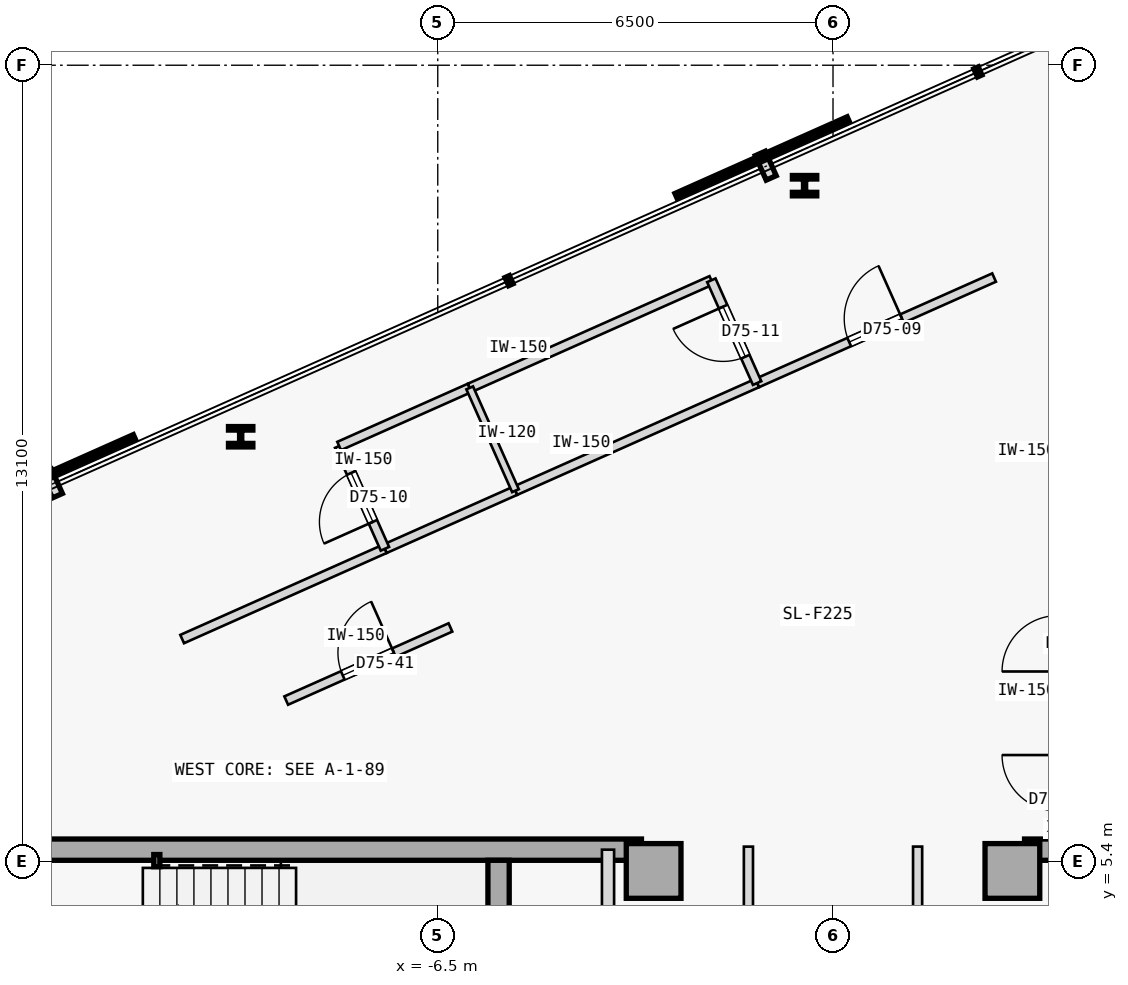
"""IFC4 building model, lengths in metres.
Left out: names, types, materials, properties, quantities, classifications, styles, units other than length and angle.
Written with IfcOpenShell. Run it as: python <this file> out.ifc"""

import sys

from ifc_helpers import new_model, si_unit, direction, frame, frame_2d, origin, origin_2d, place, context, subcontext, project, spatial, rectangle, hollow_rectangle, i_section, extrude, element, fill, save


model = new_model("IFC4")
c1 = context("Model", 3, precision=1e-05, world=origin(), true_north=direction((0.0, 1.0)))
c2 = subcontext(c1, "Body", "Model", "MODEL_VIEW")
j1 = project(units=[si_unit("LENGTHUNIT", "METRE"), si_unit("PLANEANGLEUNIT", "RADIAN")], contexts=[c1])
p1 = place(None, origin())
s1 = spatial("IfcSite", under=j1, at=p1, CompositionType="ELEMENT")
p2 = place(p1, origin())
s2 = spatial("IfcBuilding", under=s1, at=p2, CompositionType="ELEMENT")
p3 = place(p2, frame((0.0, 0.0, 281.9)))
s3 = spatial("IfcBuildingStorey", under=s2, at=p3, CompositionType="ELEMENT", Elevation=281.9)
for number, where, z_axis, x_axis in (
    (1, (-2.95, 5.25, 0.0), (0.0, 0.0, 1.0), (1.0, 0.0, 0.0)),
    (2, (2.95, 5.25, 0.0), (0.0, 0.0, 1.0), (1.0, 0.0, 0.0)),
):
    element("IfcColumn", number, at=place(p3, frame(where, z_axis=z_axis, x_axis=x_axis)), inside=s3, PredefinedType="COLUMN", context=c2, shape_type="SweptSolid", body=[
        extrude(rectangle(XDim=0.9, YDim=0.9, at=origin_2d()), origin(), (0.0, 0.0, 1.0), 3.35),
    ])
p4 = place(p3, frame((-14.56, 5.6, 0.0), z_axis=(0.0, 0.0, 1.0), x_axis=(1.0, 0.0, 0.0)))
e3 = element("IfcWall", 3, at=p4, inside=s3, PredefinedType="SHEAR", context=c2, shape_type="SweptSolid", body=[
    extrude(rectangle(XDim=11.41, YDim=0.35, at=frame_2d((5.705, 0.0))), origin(), (0.0, 0.0, 1.0), 3.125),
])
p5 = place(p3, frame((-5.5, 2.15, 0.0), z_axis=(0.0, 0.0, 1.0), x_axis=(0.0, 1.0, 0.0)))
e4 = element("IfcWall", 4, at=p5, inside=s3, PredefinedType="SHEAR", context=c2, shape_type="SweptSolid", body=[
    extrude(rectangle(XDim=3.275, YDim=0.35, at=frame_2d((1.638, 0.0))), origin(), (0.0, 0.0, 1.0), 3.125),
])
p6 = place(p3, frame((3.15, 5.6, 0.0), z_axis=(0.0, 0.0, 1.0), x_axis=(1.0, 0.0, 0.0)))
e5 = element("IfcWall", 5, at=p6, inside=s3, PredefinedType="SHEAR", context=c2, shape_type="SweptSolid", body=[
    extrude(rectangle(XDim=11.41, YDim=0.35, at=frame_2d((5.705, 0.0))), origin(), (0.0, 0.0, 1.0), 3.125),
])
p7 = place(p3, frame((-11.12, 5.42, 0.0), z_axis=(0.0, 0.0, 1.0), x_axis=(1.0, 0.0, 0.0)))
e6 = element("IfcColumn", 6, at=p7, inside=s3, PredefinedType="COLUMN", context=c2, shape_type="SweptSolid", body=[
    extrude(hollow_rectangle(XDim=0.1, YDim=0.2, WallThickness=0.008, at=origin_2d()), origin(), (0.0, 0.0, 1.0), 3.35),
])
for number, where, z_axis, x_axis in (
    (7, (-0.468, 16.519, 0.0), (0.0, 0.0, 1.0), (1.0, 0.0, 0.0)),
    (8, (-9.741, 12.39, 0.0), (0.0, 0.0, 1.0), (1.0, 0.0, 0.0)),
):
    element("IfcColumn", number, at=place(p3, frame(where, z_axis=z_axis, x_axis=x_axis)), inside=s3, PredefinedType="COLUMN", context=c2, shape_type="SweptSolid", body=[
        extrude(i_section(OverallWidth=0.401, OverallDepth=0.335, WebThickness=0.036, FlangeThickness=0.058, FilletRadius=0.015, at=origin_2d()), origin(), (0.0, 0.0, 1.0), 3.35),
    ])
p8 = place(p3, frame((-3.7, -1.15, 0.0), z_axis=(0.0, 0.0, 1.0), x_axis=(0.0, 1.0, 0.0)))
e9 = element("IfcWall", 9, at=p8, inside=s3, PredefinedType="STANDARD", context=c2, shape_type="SweptSolid", body=[
    extrude(rectangle(XDim=6.75, YDim=0.2, at=frame_2d((3.375, 0.0))), origin(), (0.0, 0.0, 1.0), 3.125),
])
p9 = place(p8, frame((3.6, 0.0, 0.0)))
e10 = element("IfcOpeningElement", 10, at=p9, cuts=e9, PredefinedType="OPENING", context=c2, shape_type="SweptSolid", body=[
    extrude(rectangle(XDim=0.92, YDim=2.15, at=frame_2d((0.46, 1.075))), frame((0.0, 0.11, 0.0), z_axis=(0.0, -1.0, 0.0), x_axis=(1.0, 0.0, 0.0)), (0.0, 0.0, 1.0), 0.22),
])
p10 = place(p8, frame((0.85, 0.0, 0.0)))
e11 = element("IfcOpeningElement", 11, at=p10, cuts=e9, PredefinedType="OPENING", context=c2, shape_type="SweptSolid", body=[
    extrude(rectangle(XDim=0.9, YDim=2.15, at=frame_2d((0.45, 1.075))), frame((0.0, 0.11, 0.0), z_axis=(0.0, -1.0, 0.0), x_axis=(1.0, 0.0, 0.0)), (0.0, 0.0, 1.0), 0.22),
])
p11 = place(p3, frame((-1.391, -5.65, 0.0), z_axis=(0.0, 0.0, 1.0), x_axis=(-2.1605738e-05, 0.999999999767, 0.0)))
e12 = element("IfcWall", 12, at=p11, inside=s3, PredefinedType="PARTITIONING", context=c2, shape_type="SweptSolid", body=[
    extrude(rectangle(XDim=11.3, YDim=0.15, at=frame_2d((5.65, 0.0))), origin(), (0.0, 0.0, 1.0), 3.125),
])
p12 = place(p3, frame((1.391, -5.65, 0.0), z_axis=(0.0, 0.0, 1.0), x_axis=(4.3206809e-05, 0.999999999067, 0.0)))
e13 = element("IfcWall", 13, at=p12, inside=s3, PredefinedType="PARTITIONING", context=c2, shape_type="SweptSolid", body=[
    extrude(rectangle(XDim=11.301, YDim=0.15, at=frame_2d((5.65, 0.0))), origin(), (0.0, 0.0, 1.0), 3.125),
])
p13 = place(p12, frame((5.176, 0.0, 0.0)))
e14 = element("IfcOpeningElement", 14, at=p13, cuts=e13, PredefinedType="OPENING", context=c2, shape_type="SweptSolid", body=[
    extrude(rectangle(XDim=0.95, YDim=2.15, at=frame_2d((0.475, 1.075))), frame((0.0, 0.085, 0.0), z_axis=(0.0, -1.0, 0.0), x_axis=(1.0, 0.0, 0.0)), (0.0, 0.0, 1.0), 0.17),
])
p14 = place(p3, frame((-10.703, 9.063, 0.0), z_axis=(0.0, 0.0, 1.0), x_axis=(0.913543802, 0.40674036169, 0.0)))
e15 = element("IfcWall", 15, at=p14, inside=s3, PredefinedType="PARTITIONING", context=c2, shape_type="SweptSolid", body=[
    extrude(rectangle(XDim=3.65, YDim=0.15, at=frame_2d((1.825, 0.0))), origin(), (0.0, 0.0, 1.0), 3.125),
])
p15 = place(p3, frame((-1.248, 13.273, 0.0), z_axis=(0.0, 0.0, 1.0), x_axis=(0.913549402293, 0.40672778313, 0.0)))
e16 = element("IfcWall", 16, at=p15, inside=s3, PredefinedType="PARTITIONING", context=c2, shape_type="SweptSolid", body=[
    extrude(rectangle(XDim=4.266, YDim=0.15, at=frame_2d((2.133, 0.0))), origin(), (0.0, 0.0, 1.0), 3.125),
])
p16 = place(p15, frame((1.658, 0.0, 0.0)))
e17 = element("IfcOpeningElement", 17, at=p16, cuts=e16, PredefinedType="OPENING", context=c2, shape_type="SweptSolid", body=[
    extrude(rectangle(XDim=0.95, YDim=2.15, at=frame_2d((0.475, 1.075))), frame((0.0, 0.085, 0.0), z_axis=(0.0, -1.0, 0.0), x_axis=(1.0, 0.0, 0.0)), (0.0, 0.0, 1.0), 0.17),
])
p17 = place(p3, frame((-7.369, 10.548, 0.0), z_axis=(0.0, 0.0, 1.0), x_axis=(0.913541436194, 0.406745675276, 0.0)))
e18 = element("IfcWall", 18, at=p17, inside=s3, PredefinedType="PARTITIONING", context=c2, shape_type="SweptSolid", body=[
    extrude(rectangle(XDim=2.35, YDim=0.15, at=frame_2d((1.175, 0.0))), origin(), (0.0, 0.0, 1.0), 3.125),
])
p18 = place(p3, frame((-5.222, 11.504, 0.0), z_axis=(0.0, 0.0, 1.0), x_axis=(0.913545193015, 0.406737237438, 0.0)))
e19 = element("IfcWall", 19, at=p18, inside=s3, PredefinedType="PARTITIONING", context=c2, shape_type="SweptSolid", body=[
    extrude(rectangle(XDim=4.35, YDim=0.15, at=frame_2d((2.175, 0.0))), origin(), (0.0, 0.0, 1.0), 3.125),
])
p19 = place(p3, frame((-8.992, 8.052, 0.0), z_axis=(0.0, 0.0, 1.0), x_axis=(0.913535467925, 0.406759079607, 0.0)))
e20 = element("IfcWall", 20, at=p19, inside=s3, PredefinedType="PARTITIONING", context=c2, shape_type="SweptSolid", body=[
    extrude(rectangle(XDim=2.956, YDim=0.15, at=frame_2d((1.478, 0.0))), origin(), (0.0, 0.0, 1.0), 3.125),
])
p20 = place(p19, frame((1.018, 0.0, 0.0)))
e21 = element("IfcOpeningElement", 21, at=p20, cuts=e20, PredefinedType="OPENING", context=c2, shape_type="SweptSolid", body=[
    extrude(rectangle(XDim=0.92, YDim=2.15, at=frame_2d((0.46, 1.075))), frame((0.0, 0.085, 0.0), z_axis=(0.0, -1.0, 0.0), x_axis=(1.0, 0.0, 0.0)), (0.0, 0.0, 1.0), 0.17),
])
p21 = place(p3, frame((-7.369, 10.548, 0.0), z_axis=(0.0, 0.0, 1.0), x_axis=(-0.406860767979, 0.913490183571, 0.0)))
e22 = element("IfcWall", 22, at=p21, inside=s3, PredefinedType="PARTITIONING", context=c2, shape_type="SweptSolid", body=[
    extrude(rectangle(XDim=1.85, YDim=0.15, at=frame_2d((0.925, 0.0))), origin(), (0.0, 0.0, 1.0), 3.125),
])
p22 = place(p21, frame((0.485, 0.0, 0.0)))
e23 = element("IfcOpeningElement", 23, at=p22, cuts=e22, PredefinedType="OPENING", context=c2, shape_type="SweptSolid", body=[
    extrude(rectangle(XDim=0.88, YDim=2.15, at=frame_2d((0.44, 1.075))), frame((0.0, 0.085, 0.0), z_axis=(0.0, -1.0, 0.0), x_axis=(1.0, 0.0, 0.0)), (0.0, 0.0, 1.0), 0.17),
])
p23 = place(p3, frame((-8.122, 12.238, 0.0), z_axis=(0.0, 0.0, 1.0), x_axis=(0.913558622212, 0.406707073682, 0.0)))
e24 = element("IfcWall", 24, at=p23, inside=s3, PredefinedType="PARTITIONING", context=c2, shape_type="SweptSolid", body=[
    extrude(rectangle(XDim=2.35, YDim=0.15, at=frame_2d((1.175, 0.0))), origin(), (0.0, 0.0, 1.0), 3.125),
])
p24 = place(p3, frame((-5.975, 13.194, 0.0), z_axis=(0.0, 0.0, 1.0), x_axis=(0.913545193015, 0.406737237438, 0.0)))
e25 = element("IfcWall", 25, at=p24, inside=s3, PredefinedType="PARTITIONING", context=c2, shape_type="SweptSolid", body=[
    extrude(rectangle(XDim=4.35, YDim=0.15, at=frame_2d((2.175, 0.0))), origin(), (0.0, 0.0, 1.0), 3.125),
])
p25 = place(p3, frame((-1.248, 13.273, 0.0), z_axis=(0.0, 0.0, 1.0), x_axis=(-0.406750635596, 0.913539227643, 0.0)))
e26 = element("IfcWall", 26, at=p25, inside=s3, PredefinedType="PARTITIONING", context=c2, shape_type="SweptSolid", body=[
    extrude(rectangle(XDim=1.85, YDim=0.15, at=frame_2d((0.925, 0.0))), origin(), (0.0, 0.0, 1.0), 3.125),
])
p26 = place(p25, frame((0.475, 0.0, 0.0)))
e27 = element("IfcOpeningElement", 27, at=p26, cuts=e26, PredefinedType="OPENING", context=c2, shape_type="SweptSolid", body=[
    extrude(rectangle(XDim=0.9, YDim=2.15, at=frame_2d((0.45, 1.075))), frame((0.0, 0.085, 0.0), z_axis=(0.0, -1.0, 0.0), x_axis=(1.0, 0.0, 0.0)), (0.0, 0.0, 1.0), 0.17),
])
p27 = place(p3, frame((-5.222, 11.504, 0.0), z_axis=(0.0, 0.0, 1.0), x_axis=(-0.406750635596, 0.913539227643, 0.0)))
e28 = element("IfcWall", 28, at=p27, inside=s3, PredefinedType="PARTITIONING", context=c2, shape_type="SweptSolid", body=[
    extrude(rectangle(XDim=1.85, YDim=0.12, at=frame_2d((0.925, 0.0))), origin(), (0.0, 0.0, 1.0), 3.125),
])
p28 = place(p16, origin())
e29 = element("IfcDoor", 29, at=p28, inside=s3, OperationType="SINGLE_SWING_RIGHT", PredefinedType="DOOR", context=c2, shape_type="SweptSolid", body=[
    extrude(rectangle(XDim=0.95, YDim=2.15, at=frame_2d((0.475, 1.075))), frame((0.0, 0.025, 0.0), z_axis=(0.0, -1.0, 0.0), x_axis=(1.0, 0.0, 0.0)), (0.0, 0.0, 1.0), 0.05),
])
fill(e17, e29)
p29 = place(p22, origin())
e30 = element("IfcDoor", 30, at=p29, inside=s3, OperationType="SINGLE_SWING_LEFT", PredefinedType="DOOR", context=c2, shape_type="SweptSolid", body=[
    extrude(rectangle(XDim=0.88, YDim=2.15, at=frame_2d((0.44, 1.075))), frame((0.0, 0.025, 0.0), z_axis=(0.0, -1.0, 0.0), x_axis=(1.0, 0.0, 0.0)), (0.0, 0.0, 1.0), 0.05),
])
fill(e23, e30)
p30 = place(p26, origin())
e31 = element("IfcDoor", 31, at=p30, inside=s3, OperationType="SINGLE_SWING_RIGHT", PredefinedType="DOOR", context=c2, shape_type="SweptSolid", body=[
    extrude(rectangle(XDim=0.9, YDim=2.15, at=frame_2d((0.45, 1.075))), frame((0.0, 0.025, 0.0), z_axis=(0.0, -1.0, 0.0), x_axis=(1.0, 0.0, 0.0)), (0.0, 0.0, 1.0), 0.05),
])
fill(e27, e31)
p31 = place(p20, origin())
e32 = element("IfcDoor", 32, at=p31, inside=s3, OperationType="SINGLE_SWING_RIGHT", PredefinedType="DOOR", context=c2, shape_type="SweptSolid", body=[
    extrude(rectangle(XDim=0.92, YDim=2.15, at=frame_2d((0.46, 1.075))), frame((0.0, 0.025, 0.0), z_axis=(0.0, -1.0, 0.0), x_axis=(1.0, 0.0, 0.0)), (0.0, 0.0, 1.0), 0.05),
])
fill(e21, e32)
save(model, sys.argv[1])
